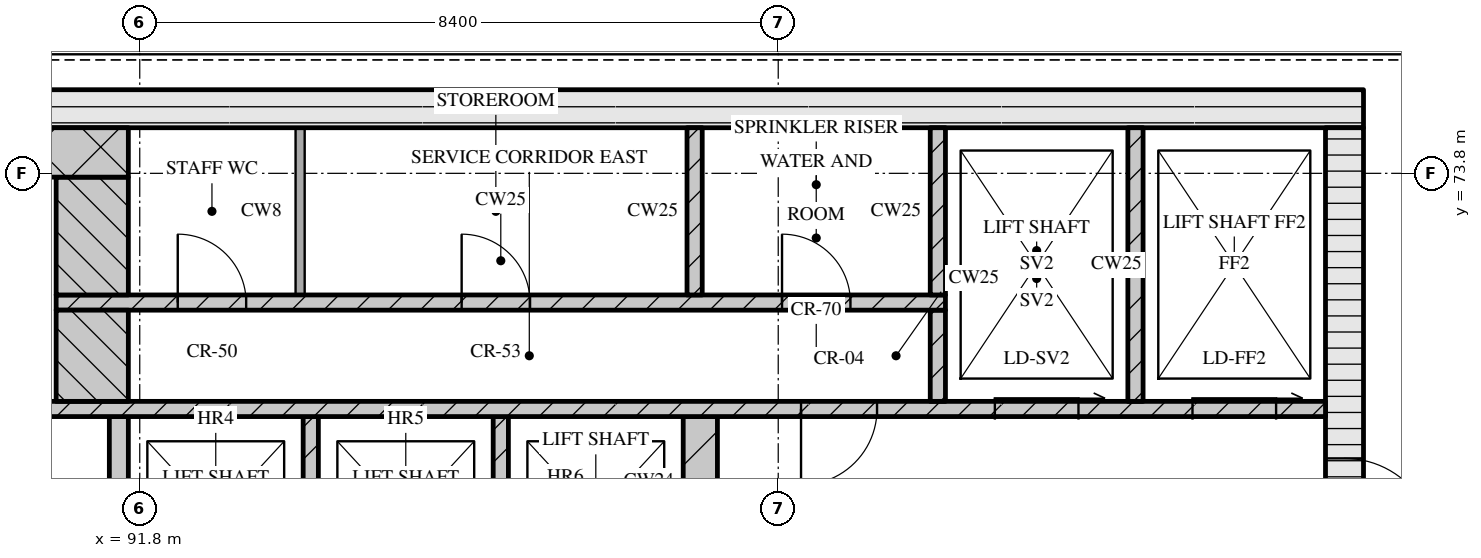
"""IFC4 building model, lengths in metres.
Left out: names, types, materials, properties, quantities, classifications, styles, units other than length and angle.
Written with IfcOpenShell. Run it as: python <this file> out.ifc"""

import sys

from ifc_helpers import new_model, si_unit, direction, frame, frame_2d, origin, place, context, subcontext, project, spatial, rectangle, extrude, element, fill, save


model = new_model("IFC4")
c1 = context("Model", 3, precision=1e-05, world=origin(), true_north=direction((0.0, 1.0)))
c2 = subcontext(c1, "Body", "Model", "MODEL_VIEW")
j1 = project(units=[si_unit("LENGTHUNIT", "METRE"), si_unit("PLANEANGLEUNIT", "RADIAN")], contexts=[c1])
p1 = place(None, origin())
s1 = spatial("IfcSite", under=j1, at=p1, CompositionType="ELEMENT")
p2 = place(p1, origin())
s2 = spatial("IfcBuilding", under=s1, at=p2, CompositionType="ELEMENT")
p3 = place(p2, frame((0.0, 0.0, 270.75)))
s3 = spatial("IfcBuildingStorey", under=s2, at=p3, CompositionType="ELEMENT", Elevation=270.75)
p4 = place(p3, frame((67.3, 74.65, 0.0), z_axis=(0.0, 0.0, 1.0), x_axis=(1.0, 0.0, 0.0)))
e1 = element("IfcWall", 1, at=p4, inside=s3, PredefinedType="SOLIDWALL", context=c2, shape_type="SweptSolid", body=[
    extrude(rectangle(XDim=40.6, YDim=0.5, at=frame_2d((20.3, 0.0))), origin(), (0.0, 0.0, 1.0), 3.32),
])
p5 = place(p3, frame((107.65, 62.4, 0.0), z_axis=(0.0, 0.0, 1.0), x_axis=(0.0, 1.0, 0.0)))
e2 = element("IfcWall", 2, at=p5, inside=s3, PredefinedType="SOLIDWALL", context=c2, shape_type="SweptSolid", body=[
    extrude(rectangle(XDim=12.0, YDim=0.5, at=frame_2d((6.0, 0.0))), origin(), (0.0, 0.0, 1.0), 3.32),
])
p6 = place(p5, frame((6.45, 0.0, 0.0)))
e3 = element("IfcOpeningElement", 3, at=p6, cuts=e2, PredefinedType="OPENING", context=c2, shape_type="SweptSolid", body=[
    extrude(rectangle(XDim=1.2, YDim=2.1, at=frame_2d((0.6, 1.05))), frame((0.0, 0.26, 0.0), z_axis=(0.0, -1.0, 0.0), x_axis=(1.0, 0.0, 0.0)), (0.0, 0.0, 1.0), 0.52),
])
p7 = place(p3, frame((91.525, 68.0, 0.0), z_axis=(0.0, 0.0, 1.0), x_axis=(0.0, 1.0, 0.0)))
e4 = element("IfcWall", 4, at=p7, inside=s3, PredefinedType="SOLIDWALL", context=c2, shape_type="SweptSolid", body=[
    extrude(rectangle(XDim=2.6, YDim=0.25, at=frame_2d((1.3, 0.0))), origin(), (0.0, 0.0, 1.0), 3.32),
])
for number, where, z_axis, x_axis in (
    (5, (94.05, 68.0, 0.0), (0.0, 0.0, 1.0), (0.0, 1.0, 0.0)),
    (6, (96.55, 68.0, 0.0), (0.0, 0.0, 1.0), (0.0, 1.0, 0.0)),
):
    element("IfcWall", number, at=place(p3, frame(where, z_axis=z_axis, x_axis=x_axis)), inside=s3, PredefinedType="SOLIDWALL", context=c2, shape_type="SweptSolid", body=[
        extrude(rectangle(XDim=2.6, YDim=0.2, at=frame_2d((1.3, 0.0))), origin(), (0.0, 0.0, 1.0), 3.32),
    ])
p8 = place(p3, frame((99.175, 68.3, 0.0), z_axis=(0.0, 0.0, 1.0), x_axis=(0.0, 1.0, 0.0)))
e7 = element("IfcWall", 7, at=p8, inside=s3, PredefinedType="SOLIDWALL", context=c2, shape_type="SweptSolid", body=[
    extrude(rectangle(XDim=2.3, YDim=0.45, at=frame_2d((1.15, 0.0))), origin(), (0.0, 0.0, 1.0), 3.32),
])
p9 = place(p3, frame((67.8, 70.7, 0.0), z_axis=(0.0, 0.0, 1.0), x_axis=(1.0, 0.0, 0.0)))
e8 = element("IfcWall", 8, at=p9, inside=s3, PredefinedType="SOLIDWALL", context=c2, shape_type="SweptSolid", body=[
    extrude(rectangle(XDim=39.6, YDim=0.2, at=frame_2d((19.8, 0.0))), origin(), (0.0, 0.0, 1.0), 3.32),
])
p10 = place(p9, frame((0.65, 0.0, 0.0)))
e9 = element("IfcOpeningElement", 9, at=p10, cuts=e8, PredefinedType="OPENING", context=c2, shape_type="SweptSolid", body=[
    extrude(rectangle(XDim=1.1, YDim=2.1, at=frame_2d((0.55, 1.05))), frame((0.0, 0.11, 0.0), z_axis=(0.0, -1.0, 0.0), x_axis=(1.0, 0.0, 0.0)), (0.0, 0.0, 1.0), 0.22),
])
p11 = place(p9, frame((3.25, 0.0, 0.0)))
e10 = element("IfcOpeningElement", 10, at=p11, cuts=e8, PredefinedType="OPENING", context=c2, shape_type="SweptSolid", body=[
    extrude(rectangle(XDim=1.1, YDim=2.1, at=frame_2d((0.55, 1.05))), frame((0.0, 0.11, 0.0), z_axis=(0.0, -1.0, 0.0), x_axis=(1.0, 0.0, 0.0)), (0.0, 0.0, 1.0), 0.22),
])
p12 = place(p9, frame((5.9, 0.0, 0.0)))
e11 = element("IfcOpeningElement", 11, at=p12, cuts=e8, PredefinedType="OPENING", context=c2, shape_type="SweptSolid", body=[
    extrude(rectangle(XDim=1.0, YDim=2.1, at=frame_2d((0.5, 1.05))), frame((0.0, 0.11, 0.0), z_axis=(0.0, -1.0, 0.0), x_axis=(1.0, 0.0, 0.0)), (0.0, 0.0, 1.0), 0.22),
])
p13 = place(p9, frame((21.7, 0.0, 0.0)))
e12 = element("IfcOpeningElement", 12, at=p13, cuts=e8, PredefinedType="OPENING", context=c2, shape_type="SweptSolid", body=[
    extrude(rectangle(XDim=1.0, YDim=2.1, at=frame_2d((0.5, 1.05))), frame((0.0, 0.11, 0.0), z_axis=(0.0, -1.0, 0.0), x_axis=(1.0, 0.0, 0.0)), (0.0, 0.0, 1.0), 0.22),
])
p14 = place(p9, frame((32.7, 0.0, 0.0)))
e13 = element("IfcOpeningElement", 13, at=p14, cuts=e8, PredefinedType="OPENING", context=c2, shape_type="SweptSolid", body=[
    extrude(rectangle(XDim=1.0, YDim=2.1, at=frame_2d((0.5, 1.05))), frame((0.0, 0.11, 0.0), z_axis=(0.0, -1.0, 0.0), x_axis=(1.0, 0.0, 0.0)), (0.0, 0.0, 1.0), 0.22),
])
p15 = place(p9, frame((35.25, 0.0, 0.0)))
e14 = element("IfcOpeningElement", 14, at=p15, cuts=e8, PredefinedType="OPENING", context=c2, shape_type="SweptSolid", body=[
    extrude(rectangle(XDim=1.1, YDim=2.1, at=frame_2d((0.55, 1.05))), frame((0.0, 0.11, 0.0), z_axis=(0.0, -1.0, 0.0), x_axis=(1.0, 0.0, 0.0)), (0.0, 0.0, 1.0), 0.22),
])
p16 = place(p9, frame((37.85, 0.0, 0.0)))
e15 = element("IfcOpeningElement", 15, at=p16, cuts=e8, PredefinedType="OPENING", context=c2, shape_type="SweptSolid", body=[
    extrude(rectangle(XDim=1.1, YDim=2.1, at=frame_2d((0.55, 1.05))), frame((0.0, 0.11, 0.0), z_axis=(0.0, -1.0, 0.0), x_axis=(1.0, 0.0, 0.0)), (0.0, 0.0, 1.0), 0.22),
])
p17 = place(p3, frame((91.175, 70.8, 0.0), z_axis=(0.0, 0.0, 1.0), x_axis=(0.0, 1.0, 0.0)))
e16 = element("IfcWall", 16, at=p17, inside=s3, PredefinedType="SOLIDWALL", context=c2, shape_type="SweptSolid", body=[
    extrude(rectangle(XDim=1.2, YDim=0.95, at=frame_2d((0.6, 0.0))), origin(), (0.0, 0.0, 1.0), 3.32),
])
p18 = place(p3, frame((102.3, 70.8, 0.0), z_axis=(0.0, 0.0, 1.0), x_axis=(0.0, 1.0, 0.0)))
e17 = element("IfcWall", 17, at=p18, inside=s3, PredefinedType="SOLIDWALL", context=c2, shape_type="SweptSolid", body=[
    extrude(rectangle(XDim=1.2, YDim=0.2, at=frame_2d((0.6, 0.0))), origin(), (0.0, 0.0, 1.0), 3.32),
])
p19 = place(p3, frame((104.9, 70.8, 0.0), z_axis=(0.0, 0.0, 1.0), x_axis=(0.0, 1.0, 0.0)))
e18 = element("IfcWall", 18, at=p19, inside=s3, PredefinedType="SOLIDWALL", context=c2, shape_type="SweptSolid", body=[
    extrude(rectangle(XDim=3.6, YDim=0.2, at=frame_2d((1.8, 0.0))), origin(), (0.0, 0.0, 1.0), 3.32),
])
p20 = place(p3, frame((90.7, 72.1, 0.0), z_axis=(0.0, 0.0, 1.0), x_axis=(1.0, 0.0, 0.0)))
e19 = element("IfcWall", 19, at=p20, inside=s3, PredefinedType="SOLIDWALL", context=c2, shape_type="SweptSolid", body=[
    extrude(rectangle(XDim=11.7, YDim=0.2, at=frame_2d((5.85, 0.0))), origin(), (0.0, 0.0, 1.0), 3.32),
])
p21 = place(p20, frame((1.6, 0.0, 0.0)))
e20 = element("IfcOpeningElement", 20, at=p21, cuts=e19, PredefinedType="OPENING", context=c2, shape_type="SweptSolid", body=[
    extrude(rectangle(XDim=0.9, YDim=2.1, at=frame_2d((0.45, 1.05))), frame((0.0, 0.11, 0.0), z_axis=(0.0, -1.0, 0.0), x_axis=(1.0, 0.0, 0.0)), (0.0, 0.0, 1.0), 0.22),
])
p22 = place(p20, frame((5.335, 0.0, 0.0)))
e21 = element("IfcOpeningElement", 21, at=p22, cuts=e19, PredefinedType="OPENING", context=c2, shape_type="SweptSolid", body=[
    extrude(rectangle(XDim=0.9, YDim=2.1, at=frame_2d((0.45, 1.05))), frame((0.0, 0.11, 0.0), z_axis=(0.0, -1.0, 0.0), x_axis=(1.0, 0.0, 0.0)), (0.0, 0.0, 1.0), 0.22),
])
p23 = place(p20, frame((9.55, 0.0, 0.0)))
e22 = element("IfcOpeningElement", 22, at=p23, cuts=e19, PredefinedType="OPENING", context=c2, shape_type="SweptSolid", body=[
    extrude(rectangle(XDim=0.9, YDim=2.1, at=frame_2d((0.45, 1.05))), frame((0.0, 0.11, 0.0), z_axis=(0.0, -1.0, 0.0), x_axis=(1.0, 0.0, 0.0)), (0.0, 0.0, 1.0), 0.22),
])
p24 = place(p3, frame((91.175, 72.2, 0.0), z_axis=(0.0, 0.0, 1.0), x_axis=(0.0, 1.0, 0.0)))
e23 = element("IfcWall", 23, at=p24, inside=s3, PredefinedType="SOLIDWALL", context=c2, shape_type="SweptSolid", body=[
    extrude(rectangle(XDim=1.55, YDim=0.95, at=frame_2d((0.775, 0.0))), origin(), (0.0, 0.0, 1.0), 3.32),
])
p25 = place(p3, frame((93.91, 72.2, 0.0), z_axis=(0.0, 0.0, 1.0), x_axis=(0.0, 1.0, 0.0)))
e24 = element("IfcWall", 24, at=p25, inside=s3, PredefinedType="PARTITIONING", context=c2, shape_type="SweptSolid", body=[
    extrude(rectangle(XDim=2.2, YDim=0.12, at=frame_2d((1.1, 0.0))), origin(), (0.0, 0.0, 1.0), 3.32),
])
for number, where, z_axis, x_axis in (
    (25, (99.1, 72.2, 0.0), (0.0, 0.0, 1.0), (0.0, 1.0, 0.0)),
    (26, (102.3, 72.2, 0.0), (0.0, 0.0, 1.0), (0.0, 1.0, 0.0)),
):
    element("IfcWall", number, at=place(p3, frame(where, z_axis=z_axis, x_axis=x_axis)), inside=s3, PredefinedType="SOLIDWALL", context=c2, shape_type="SweptSolid", body=[
        extrude(rectangle(XDim=2.2, YDim=0.2, at=frame_2d((1.1, 0.0))), origin(), (0.0, 0.0, 1.0), 3.32),
    ])
p26 = place(p3, frame((83.55, 74.075, 0.0), z_axis=(0.0, 0.0, 1.0), x_axis=(1.0, 0.0, 0.0)))
e27 = element("IfcWall", 27, at=p26, inside=s3, PredefinedType="SOLIDWALL", context=c2, shape_type="SweptSolid", body=[
    extrude(rectangle(XDim=8.1, YDim=0.65, at=frame_2d((4.05, 0.0))), origin(), (0.0, 0.0, 1.0), 3.32),
])
p27 = place(p6, origin())
e28 = element("IfcDoor", 28, at=p27, inside=s3, OperationType="SINGLE_SWING_RIGHT", PredefinedType="DOOR", context=c2, shape_type="SweptSolid", body=[
    extrude(rectangle(XDim=1.2, YDim=2.1, at=frame_2d((0.6, 1.05))), frame((0.0, 0.025, 0.0), z_axis=(0.0, -1.0, 0.0), x_axis=(1.0, 0.0, 0.0)), (0.0, 0.0, 1.0), 0.05),
])
fill(e3, e28)
p28 = place(p14, origin())
e29 = element("IfcDoor", 29, at=p28, inside=s3, OperationType="SINGLE_SWING_RIGHT", PredefinedType="DOOR", context=c2, shape_type="SweptSolid", body=[
    extrude(rectangle(XDim=1.0, YDim=2.1, at=frame_2d((0.5, 1.05))), frame((0.0, 0.025, 0.0), z_axis=(0.0, -1.0, 0.0), x_axis=(1.0, 0.0, 0.0)), (0.0, 0.0, 1.0), 0.05),
])
fill(e13, e29)
p29 = place(p15, origin())
e30 = element("IfcDoor", 30, at=p29, inside=s3, OperationType="SLIDING_TO_RIGHT", PredefinedType="DOOR", context=c2, shape_type="SweptSolid", body=[
    extrude(rectangle(XDim=1.1, YDim=2.1, at=frame_2d((0.55, 1.05))), frame((0.0, 0.025, 0.0), z_axis=(0.0, -1.0, 0.0), x_axis=(1.0, 0.0, 0.0)), (0.0, 0.0, 1.0), 0.05),
])
fill(e14, e30)
p30 = place(p16, origin())
e31 = element("IfcDoor", 31, at=p30, inside=s3, OperationType="SLIDING_TO_RIGHT", PredefinedType="DOOR", context=c2, shape_type="SweptSolid", body=[
    extrude(rectangle(XDim=1.1, YDim=2.1, at=frame_2d((0.55, 1.05))), frame((0.0, 0.025, 0.0), z_axis=(0.0, -1.0, 0.0), x_axis=(1.0, 0.0, 0.0)), (0.0, 0.0, 1.0), 0.05),
])
fill(e15, e31)
p31 = place(p21, origin())
e32 = element("IfcDoor", 32, at=p31, inside=s3, OperationType="SINGLE_SWING_LEFT", PredefinedType="DOOR", context=c2, shape_type="SweptSolid", body=[
    extrude(rectangle(XDim=0.9, YDim=2.1, at=frame_2d((0.45, 1.05))), frame((0.0, 0.025, 0.0), z_axis=(0.0, -1.0, 0.0), x_axis=(1.0, 0.0, 0.0)), (0.0, 0.0, 1.0), 0.05),
])
fill(e20, e32)
p32 = place(p22, origin())
e33 = element("IfcDoor", 33, at=p32, inside=s3, OperationType="SINGLE_SWING_LEFT", PredefinedType="DOOR", context=c2, shape_type="SweptSolid", body=[
    extrude(rectangle(XDim=0.9, YDim=2.1, at=frame_2d((0.45, 1.05))), frame((0.0, 0.025, 0.0), z_axis=(0.0, -1.0, 0.0), x_axis=(1.0, 0.0, 0.0)), (0.0, 0.0, 1.0), 0.05),
])
fill(e21, e33)
p33 = place(p23, origin())
e34 = element("IfcDoor", 34, at=p33, inside=s3, OperationType="SINGLE_SWING_LEFT", PredefinedType="DOOR", context=c2, shape_type="SweptSolid", body=[
    extrude(rectangle(XDim=0.9, YDim=2.1, at=frame_2d((0.45, 1.05))), frame((0.0, 0.025, 0.0), z_axis=(0.0, -1.0, 0.0), x_axis=(1.0, 0.0, 0.0)), (0.0, 0.0, 1.0), 0.05),
])
fill(e22, e34)
save(model, sys.argv[1])
